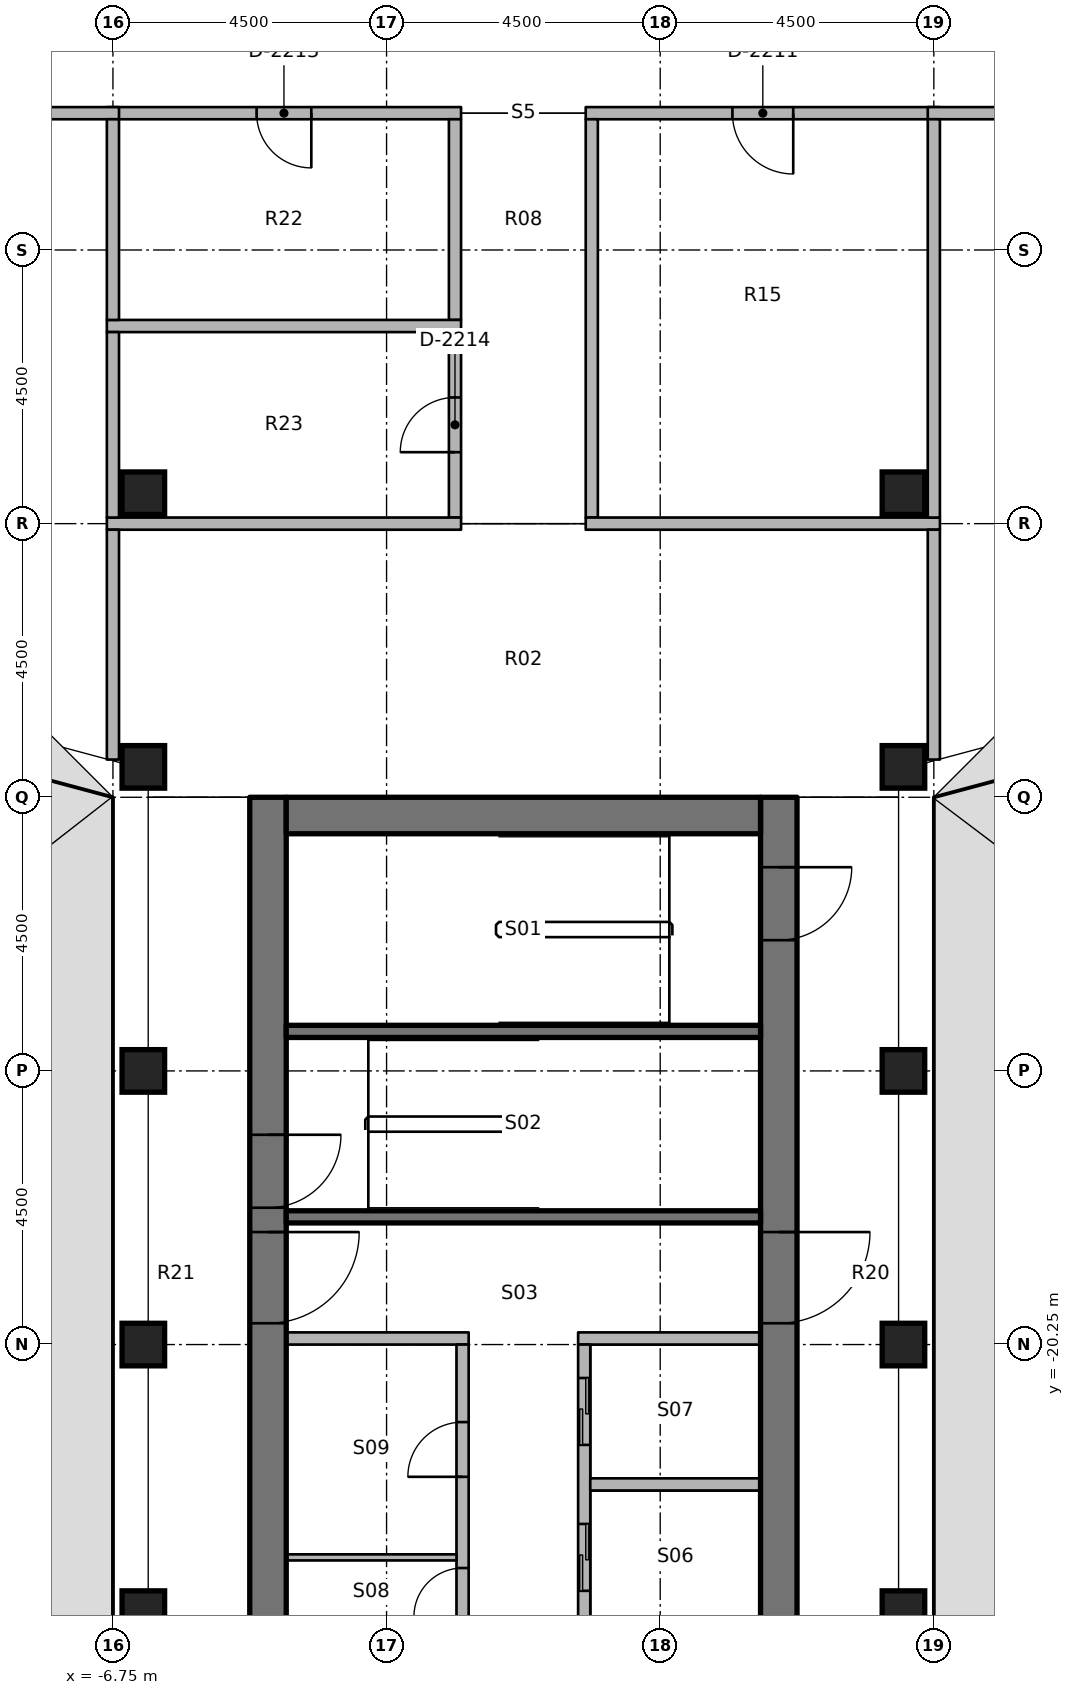
"""IFC4 building model, lengths in metres.
Left out: names, types, materials, properties, quantities, classifications, styles, units other than length and angle.
Written with IfcOpenShell. Run it as: python <this file> out.ifc"""

import sys

from ifc_helpers import new_model, si_unit, direction, frame, frame_2d, origin, origin_2d, place, context, subcontext, project, spatial, rectangle, extrude, element, fill, save


model = new_model("IFC4")
c1 = context("Model", 3, precision=1e-05, world=origin(), true_north=direction((0.0, 1.0)))
c2 = subcontext(c1, "Body", "Model", "MODEL_VIEW")
j1 = project(units=[si_unit("LENGTHUNIT", "METRE"), si_unit("PLANEANGLEUNIT", "RADIAN")], contexts=[c1])
p1 = place(None, origin())
s1 = spatial("IfcSite", under=j1, at=p1, CompositionType="ELEMENT")
p2 = place(p1, origin())
s2 = spatial("IfcBuilding", under=s1, at=p2, CompositionType="ELEMENT")
p3 = place(p2, frame((0.0, 0.0, 206.8)))
s3 = spatial("IfcBuildingStorey", under=s2, at=p3, CompositionType="ELEMENT", Elevation=206.8)
for number, where, z_axis, x_axis in (
    (1, (-6.25, -24.65, 0.0), (0.0, 0.0, 1.0), (1.0, 0.0, 0.0)),
    (2, (-6.25, -20.25, 0.0), (0.0, 0.0, 1.0), (1.0, 0.0, 0.0)),
    (3, (-6.25, -15.75, 0.0), (0.0, 0.0, 1.0), (1.0, 0.0, 0.0)),
    (4, (-6.25, -10.75, 0.0), (0.0, 0.0, 1.0), (1.0, 0.0, 0.0)),
    (5, (-6.25, -6.25, 0.0), (0.0, 0.0, 1.0), (1.0, 0.0, 0.0)),
    (6, (6.25, -24.65, 0.0), (0.0, 0.0, 1.0), (1.0, 0.0, 0.0)),
    (7, (6.25, -20.25, 0.0), (0.0, 0.0, 1.0), (1.0, 0.0, 0.0)),
    (8, (6.25, -15.75, 0.0), (0.0, 0.0, 1.0), (1.0, 0.0, 0.0)),
    (9, (6.25, -10.75, 0.0), (0.0, 0.0, 1.0), (1.0, 0.0, 0.0)),
    (10, (6.25, -6.25, 0.0), (0.0, 0.0, 1.0), (1.0, 0.0, 0.0)),
):
    element("IfcColumn", number, at=place(p3, frame(where, z_axis=z_axis, x_axis=x_axis)), inside=s3, PredefinedType="COLUMN", context=c2, shape_type="SweptSolid", body=[
        extrude(rectangle(XDim=0.7, YDim=0.7, at=origin_2d()), origin(), (0.0, 0.0, 1.0), 3.65),
    ])
p4 = place(p3, frame((-4.2, -11.25, 0.0), z_axis=(0.0, 0.0, 1.0), x_axis=(0.0, -1.0, 0.0)))
e11 = element("IfcWall", 11, at=p4, inside=s3, PredefinedType="SHEAR", context=c2, shape_type="SweptSolid", body=[
    extrude(rectangle(XDim=15.0, YDim=0.6, at=frame_2d((7.5, 0.0))), origin(), (0.0, 0.0, 1.0), 3.8),
])
p5 = place(p4, frame((7.15, 0.0, 0.0)))
e12 = element("IfcOpeningElement", 12, at=p5, cuts=e11, PredefinedType="OPENING", context=c2, shape_type="SweptSolid", body=[
    extrude(rectangle(XDim=1.5, YDim=2.3, at=frame_2d((0.75, 1.15))), frame((0.0, 0.31, 0.0), z_axis=(0.0, -1.0, 0.0), x_axis=(1.0, 0.0, 0.0)), (0.0, 0.0, 1.0), 0.62),
])
p6 = place(p4, frame((5.55, 0.0, 0.0)))
e13 = element("IfcOpeningElement", 13, at=p6, cuts=e11, PredefinedType="OPENING", context=c2, shape_type="SweptSolid", body=[
    extrude(rectangle(XDim=1.2, YDim=2.1, at=frame_2d((0.6, 1.05))), frame((0.0, 0.31, 0.0), z_axis=(0.0, -1.0, 0.0), x_axis=(1.0, 0.0, 0.0)), (0.0, 0.0, 1.0), 0.62),
])
p7 = place(p3, frame((4.2, -11.25, 0.0), z_axis=(0.0, 0.0, 1.0), x_axis=(0.0, -1.0, 0.0)))
e14 = element("IfcWall", 14, at=p7, inside=s3, PredefinedType="SHEAR", context=c2, shape_type="SweptSolid", body=[
    extrude(rectangle(XDim=15.0, YDim=0.6, at=frame_2d((7.5, 0.0))), origin(), (0.0, 0.0, 1.0), 3.8),
])
p8 = place(p7, frame((7.15, 0.0, 0.0)))
e15 = element("IfcOpeningElement", 15, at=p8, cuts=e14, PredefinedType="OPENING", context=c2, shape_type="SweptSolid", body=[
    extrude(rectangle(XDim=1.5, YDim=2.3, at=frame_2d((0.75, 1.15))), frame((0.0, 0.31, 0.0), z_axis=(0.0, -1.0, 0.0), x_axis=(1.0, 0.0, 0.0)), (0.0, 0.0, 1.0), 0.62),
])
p9 = place(p7, frame((13.9, 0.0, 0.0)))
e16 = element("IfcOpeningElement", 16, at=p9, cuts=e14, PredefinedType="OPENING", context=c2, shape_type="SweptSolid", body=[
    extrude(rectangle(XDim=0.9, YDim=2.1, at=frame_2d((0.45, 1.05))), frame((0.0, 0.31, 0.0), z_axis=(0.0, -1.0, 0.0), x_axis=(1.0, 0.0, 0.0)), (0.0, 0.0, 1.0), 0.62),
])
p10 = place(p7, frame((1.15, 0.0, 0.0)))
e17 = element("IfcOpeningElement", 17, at=p10, cuts=e14, PredefinedType="OPENING", context=c2, shape_type="SweptSolid", body=[
    extrude(rectangle(XDim=1.2, YDim=2.1, at=frame_2d((0.6, 1.05))), frame((0.0, 0.31, 0.0), z_axis=(0.0, -1.0, 0.0), x_axis=(1.0, 0.0, 0.0)), (0.0, 0.0, 1.0), 0.62),
])
p11 = place(p3, frame((-3.9, -11.55, 0.0), z_axis=(0.0, 0.0, 1.0), x_axis=(1.0, 0.0, 0.0)))
e18 = element("IfcWall", 18, at=p11, inside=s3, PredefinedType="SHEAR", context=c2, shape_type="SweptSolid", body=[
    extrude(rectangle(XDim=7.8, YDim=0.6, at=frame_2d((3.9, 0.0))), origin(), (0.0, 0.0, 1.0), 3.8),
])
for number, where, z_axis, x_axis in (
    (19, (3.9, -18.15, 0.0), (0.0, 0.0, 1.0), (-1.0, 0.0, 0.0)),
    (20, (3.9, -15.1, 0.0), (0.0, 0.0, 1.0), (-1.0, 0.0, 0.0)),
):
    element("IfcWall", number, at=place(p3, frame(where, z_axis=z_axis, x_axis=x_axis)), inside=s3, PredefinedType="SHEAR", context=c2, shape_type="SweptSolid", body=[
        extrude(rectangle(XDim=7.8, YDim=0.2, at=frame_2d((3.9, 0.0))), origin(), (0.0, 0.0, 1.0), 3.65),
    ])
p12 = place(p3, frame((3.9, -20.15, 0.0), z_axis=(0.0, 0.0, 1.0), x_axis=(-1.0, 0.0, 0.0)))
e21 = element("IfcWall", 21, at=p12, inside=s3, PredefinedType="PARTITIONING", context=c2, shape_type="SweptSolid", body=[
    extrude(rectangle(XDim=3.0, YDim=0.2, at=frame_2d((1.5, 0.0))), origin(), (0.0, 0.0, 1.0), 3.65),
])
p13 = place(p3, frame((1.0, -24.85, 0.0), z_axis=(0.0, 0.0, 1.0), x_axis=(0.0, 1.0, 0.0)))
e22 = element("IfcWall", 22, at=p13, inside=s3, PredefinedType="PARTITIONING", context=c2, shape_type="SweptSolid", body=[
    extrude(rectangle(XDim=4.6, YDim=0.2, at=frame_2d((2.3, 0.0))), origin(), (0.0, 0.0, 1.0), 3.65),
])
p14 = place(p13, frame((0.55, 0.0, 0.0)))
e23 = element("IfcOpeningElement", 23, at=p14, cuts=e22, PredefinedType="OPENING", context=c2, shape_type="SweptSolid", body=[
    extrude(rectangle(XDim=1.1, YDim=2.3, at=frame_2d((0.55, 1.15))), frame((0.0, 0.11, 0.0), z_axis=(0.0, -1.0, 0.0), x_axis=(1.0, 0.0, 0.0)), (0.0, 0.0, 1.0), 0.22),
])
p15 = place(p13, frame((2.95, 0.0, 0.0)))
e24 = element("IfcOpeningElement", 24, at=p15, cuts=e22, PredefinedType="OPENING", context=c2, shape_type="SweptSolid", body=[
    extrude(rectangle(XDim=1.1, YDim=2.3, at=frame_2d((0.55, 1.15))), frame((0.0, 0.11, 0.0), z_axis=(0.0, -1.0, 0.0), x_axis=(1.0, 0.0, 0.0)), (0.0, 0.0, 1.0), 0.22),
])
p16 = place(p3, frame((-0.9, -20.15, 0.0), z_axis=(0.0, 0.0, 1.0), x_axis=(-1.0, 0.0, 0.0)))
e25 = element("IfcWall", 25, at=p16, inside=s3, PredefinedType="PARTITIONING", context=c2, shape_type="SweptSolid", body=[
    extrude(rectangle(XDim=3.0, YDim=0.2, at=frame_2d((1.5, 0.0))), origin(), (0.0, 0.0, 1.0), 3.65),
])
p17 = place(p3, frame((-1.0, -24.85, 0.0), z_axis=(0.0, 0.0, 1.0), x_axis=(0.0, 1.0, 0.0)))
e26 = element("IfcWall", 26, at=p17, inside=s3, PredefinedType="PARTITIONING", context=c2, shape_type="SweptSolid", body=[
    extrude(rectangle(XDim=4.6, YDim=0.2, at=frame_2d((2.3, 0.0))), origin(), (0.0, 0.0, 1.0), 3.65),
])
p18 = place(p17, frame((0.125, 0.0, 0.0)))
e27 = element("IfcOpeningElement", 27, at=p18, cuts=e26, PredefinedType="OPENING", context=c2, shape_type="SweptSolid", body=[
    extrude(rectangle(XDim=0.8, YDim=2.1, at=frame_2d((0.4, 1.05))), frame((0.0, 0.11, 0.0), z_axis=(0.0, -1.0, 0.0), x_axis=(1.0, 0.0, 0.0)), (0.0, 0.0, 1.0), 0.22),
])
p19 = place(p17, frame((2.425, 0.0, 0.0)))
e28 = element("IfcOpeningElement", 28, at=p19, cuts=e26, PredefinedType="OPENING", context=c2, shape_type="SweptSolid", body=[
    extrude(rectangle(XDim=0.9, YDim=2.1, at=frame_2d((0.45, 1.05))), frame((0.0, 0.11, 0.0), z_axis=(0.0, -1.0, 0.0), x_axis=(1.0, 0.0, 0.0)), (0.0, 0.0, 1.0), 0.22),
])
p20 = place(p3, frame((3.9, -22.55, 0.0), z_axis=(0.0, 0.0, 1.0), x_axis=(-1.0, 0.0, 0.0)))
e29 = element("IfcWall", 29, at=p20, inside=s3, PredefinedType="PARTITIONING", context=c2, shape_type="SweptSolid", body=[
    extrude(rectangle(XDim=2.8, YDim=0.2, at=frame_2d((1.4, 0.0))), origin(), (0.0, 0.0, 1.0), 3.65),
])
p21 = place(p3, frame((-1.1, -23.75, 0.0), z_axis=(0.0, 0.0, 1.0), x_axis=(-1.0, 0.0, 0.0)))
e30 = element("IfcWall", 30, at=p21, inside=s3, PredefinedType="PARTITIONING", context=c2, shape_type="SweptSolid", body=[
    extrude(rectangle(XDim=2.8, YDim=0.1, at=frame_2d((1.4, 0.0))), origin(), (0.0, 0.0, 1.0), 3.65),
])
p22 = place(p3, frame((6.85, 0.0, 0.0), z_axis=(0.0, 0.0, 1.0), x_axis=(-1.0, 0.0, 0.0)))
e31 = element("IfcWall", 31, at=p22, inside=s3, PredefinedType="PARTITIONING", context=c2, shape_type="SweptSolid", body=[
    extrude(rectangle(XDim=5.825, YDim=0.2, at=frame_2d((2.913, 0.0))), origin(), (0.0, 0.0, 1.0), 2.75),
])
p23 = place(p22, frame((2.413, 0.0, 0.0)))
e32 = element("IfcOpeningElement", 32, at=p23, cuts=e31, PredefinedType="OPENING", context=c2, shape_type="SweptSolid", body=[
    extrude(rectangle(XDim=1.0, YDim=2.1, at=frame_2d((0.5, 1.05))), frame((0.0, 0.11, 0.0), z_axis=(0.0, -1.0, 0.0), x_axis=(1.0, 0.0, 0.0)), (0.0, 0.0, 1.0), 0.22),
])
p24 = place(p3, frame((11.35, 0.0, 0.0), z_axis=(0.0, 0.0, 1.0), x_axis=(-1.0, 0.0, 0.0)))
e33 = element("IfcWall", 33, at=p24, inside=s3, PredefinedType="PARTITIONING", context=c2, shape_type="SweptSolid", body=[
    extrude(rectangle(XDim=4.7, YDim=0.2, at=frame_2d((2.35, 0.0))), origin(), (0.0, 0.0, 1.0), 2.75),
])
p25 = place(p24, frame((1.85, 0.0, 0.0)))
e34 = element("IfcOpeningElement", 34, at=p25, cuts=e33, PredefinedType="OPENING", context=c2, shape_type="SweptSolid", body=[
    extrude(rectangle(XDim=1.0, YDim=2.1, at=frame_2d((0.5, 1.05))), frame((0.0, 0.11, 0.0), z_axis=(0.0, -1.0, 0.0), x_axis=(1.0, 0.0, 0.0)), (0.0, 0.0, 1.0), 0.22),
])
p26 = place(p3, frame((-1.025, 0.0, 0.0), z_axis=(0.0, 0.0, 1.0), x_axis=(-1.0, 0.0, 0.0)))
e35 = element("IfcWall", 35, at=p26, inside=s3, PredefinedType="PARTITIONING", context=c2, shape_type="SweptSolid", body=[
    extrude(rectangle(XDim=5.825, YDim=0.2, at=frame_2d((2.913, 0.0))), origin(), (0.0, 0.0, 1.0), 2.75),
])
p27 = place(p26, frame((2.462, 0.0, 0.0)))
e36 = element("IfcOpeningElement", 36, at=p27, cuts=e35, PredefinedType="OPENING", context=c2, shape_type="SweptSolid", body=[
    extrude(rectangle(XDim=0.9, YDim=2.1, at=frame_2d((0.45, 1.05))), frame((0.0, 0.11, 0.0), z_axis=(0.0, -1.0, 0.0), x_axis=(1.0, 0.0, 0.0)), (0.0, 0.0, 1.0), 0.22),
])
p28 = place(p3, frame((-6.65, 0.0, 0.0), z_axis=(0.0, 0.0, 1.0), x_axis=(-1.0, 0.0, 0.0)))
e37 = element("IfcWall", 37, at=p28, inside=s3, PredefinedType="PARTITIONING", context=c2, shape_type="SweptSolid", body=[
    extrude(rectangle(XDim=4.7, YDim=0.2, at=frame_2d((2.35, 0.0))), origin(), (0.0, 0.0, 1.0), 2.75),
])
p29 = place(p28, frame((1.85, 0.0, 0.0)))
e38 = element("IfcOpeningElement", 38, at=p29, cuts=e37, PredefinedType="OPENING", context=c2, shape_type="SweptSolid", body=[
    extrude(rectangle(XDim=1.0, YDim=2.1, at=frame_2d((0.5, 1.05))), frame((0.0, 0.11, 0.0), z_axis=(0.0, -1.0, 0.0), x_axis=(1.0, 0.0, 0.0)), (0.0, 0.0, 1.0), 0.22),
])
p30 = place(p3, frame((1.125, -6.65, 0.0), z_axis=(0.0, 0.0, 1.0), x_axis=(0.0, 1.0, 0.0)))
e39 = element("IfcWall", 39, at=p30, inside=s3, PredefinedType="PARTITIONING", context=c2, shape_type="SweptSolid", body=[
    extrude(rectangle(XDim=6.55, YDim=0.2, at=frame_2d((3.275, 0.0))), origin(), (0.0, 0.0, 1.0), 2.75),
])
p31 = place(p3, frame((-1.125, -3.4, 0.0), z_axis=(0.0, 0.0, 1.0), x_axis=(0.0, 1.0, 0.0)))
e40 = element("IfcWall", 40, at=p31, inside=s3, PredefinedType="PARTITIONING", context=c2, shape_type="SweptSolid", body=[
    extrude(rectangle(XDim=3.3, YDim=0.2, at=frame_2d((1.65, 0.0))), origin(), (0.0, 0.0, 1.0), 2.75),
])
p32 = place(p3, frame((-1.125, -6.65, 0.0), z_axis=(0.0, 0.0, 1.0), x_axis=(0.0, 1.0, 0.0)))
e41 = element("IfcWall", 41, at=p32, inside=s3, PredefinedType="PARTITIONING", context=c2, shape_type="SweptSolid", body=[
    extrude(rectangle(XDim=3.05, YDim=0.2, at=frame_2d((1.525, 0.0))), origin(), (0.0, 0.0, 1.0), 2.75),
])
p33 = place(p32, frame((1.075, 0.0, 0.0)))
e42 = element("IfcOpeningElement", 42, at=p33, cuts=e41, PredefinedType="OPENING", context=c2, shape_type="SweptSolid", body=[
    extrude(rectangle(XDim=0.9, YDim=2.1, at=frame_2d((0.45, 1.05))), frame((0.0, 0.11, 0.0), z_axis=(0.0, -1.0, 0.0), x_axis=(1.0, 0.0, 0.0)), (0.0, 0.0, 1.0), 0.22),
])
p34 = place(p3, frame((1.025, -6.75, 0.0), z_axis=(0.0, 0.0, 1.0), x_axis=(1.0, 0.0, 0.0)))
e43 = element("IfcWall", 43, at=p34, inside=s3, PredefinedType="PARTITIONING", context=c2, shape_type="SweptSolid", body=[
    extrude(rectangle(XDim=5.825, YDim=0.2, at=frame_2d((2.913, 0.0))), origin(), (0.0, 0.0, 1.0), 2.75),
])
p35 = place(p3, frame((6.75, -10.63, 0.0), z_axis=(0.0, 0.0, 1.0), x_axis=(0.0, 1.0, 0.0)))
e44 = element("IfcWall", 44, at=p35, inside=s3, PredefinedType="PARTITIONING", context=c2, shape_type="SweptSolid", body=[
    extrude(rectangle(XDim=3.78, YDim=0.2, at=frame_2d((1.89, 0.0))), origin(), (0.0, 0.0, 1.0), 2.75),
])
p36 = place(p3, frame((-6.85, -6.75, 0.0), z_axis=(0.0, 0.0, 1.0), x_axis=(1.0, 0.0, 0.0)))
e45 = element("IfcWall", 45, at=p36, inside=s3, PredefinedType="PARTITIONING", context=c2, shape_type="SweptSolid", body=[
    extrude(rectangle(XDim=5.825, YDim=0.2, at=frame_2d((2.913, 0.0))), origin(), (0.0, 0.0, 1.0), 2.75),
])
p37 = place(p3, frame((-6.75, -10.63, 0.0), z_axis=(0.0, 0.0, 1.0), x_axis=(0.0, 1.0, 0.0)))
e46 = element("IfcWall", 46, at=p37, inside=s3, PredefinedType="PARTITIONING", context=c2, shape_type="SweptSolid", body=[
    extrude(rectangle(XDim=3.78, YDim=0.2, at=frame_2d((1.89, 0.0))), origin(), (0.0, 0.0, 1.0), 2.75),
])
p38 = place(p3, frame((6.75, -6.65, 0.0), z_axis=(0.0, 0.0, 1.0), x_axis=(0.0, 1.0, 0.0)))
e47 = element("IfcWall", 47, at=p38, inside=s3, PredefinedType="PARTITIONING", context=c2, shape_type="SweptSolid", body=[
    extrude(rectangle(XDim=6.55, YDim=0.2, at=frame_2d((3.275, 0.0))), origin(), (0.0, 0.0, 1.0), 2.75),
])
p39 = place(p3, frame((-6.85, -3.5, 0.0), z_axis=(0.0, 0.0, 1.0), x_axis=(1.0, 0.0, 0.0)))
e48 = element("IfcWall", 48, at=p39, inside=s3, PredefinedType="PARTITIONING", context=c2, shape_type="SweptSolid", body=[
    extrude(rectangle(XDim=5.825, YDim=0.2, at=frame_2d((2.913, 0.0))), origin(), (0.0, 0.0, 1.0), 2.75),
])
p40 = place(p3, frame((-6.75, -3.4, 0.0), z_axis=(0.0, 0.0, 1.0), x_axis=(0.0, 1.0, 0.0)))
e49 = element("IfcWall", 49, at=p40, inside=s3, PredefinedType="PARTITIONING", context=c2, shape_type="SweptSolid", body=[
    extrude(rectangle(XDim=3.3, YDim=0.2, at=frame_2d((1.65, 0.0))), origin(), (0.0, 0.0, 1.0), 2.75),
])
p41 = place(p3, frame((-6.75, -6.65, 0.0), z_axis=(0.0, 0.0, 1.0), x_axis=(0.0, 1.0, 0.0)))
e50 = element("IfcWall", 50, at=p41, inside=s3, PredefinedType="PARTITIONING", context=c2, shape_type="SweptSolid", body=[
    extrude(rectangle(XDim=3.05, YDim=0.2, at=frame_2d((1.525, 0.0))), origin(), (0.0, 0.0, 1.0), 2.75),
])
p42 = place(p8, origin())
e51 = element("IfcDoor", 51, at=p42, inside=s3, OperationType="DOUBLE_DOOR_SINGLE_SWING", PredefinedType="DOOR", context=c2, shape_type="SweptSolid", body=[
    extrude(rectangle(XDim=1.5, YDim=2.3, at=frame_2d((0.75, 1.15))), frame((0.0, 0.025, 0.0), z_axis=(0.0, -1.0, 0.0), x_axis=(1.0, 0.0, 0.0)), (0.0, 0.0, 1.0), 0.05),
])
fill(e15, e51)
p43 = place(p5, origin())
e52 = element("IfcDoor", 52, at=p43, inside=s3, OperationType="DOUBLE_DOOR_SINGLE_SWING", PredefinedType="DOOR", context=c2, shape_type="SweptSolid", body=[
    extrude(rectangle(XDim=1.5, YDim=2.3, at=frame_2d((0.75, 1.15))), frame((0.0, 0.025, 0.0), z_axis=(0.0, -1.0, 0.0), x_axis=(1.0, 0.0, 0.0)), (0.0, 0.0, 1.0), 0.05),
])
fill(e12, e52)
p44 = place(p6, origin())
e53 = element("IfcDoor", 53, at=p44, inside=s3, OperationType="SINGLE_SWING_LEFT", PredefinedType="DOOR", context=c2, shape_type="SweptSolid", body=[
    extrude(rectangle(XDim=1.2, YDim=2.1, at=frame_2d((0.6, 1.05))), frame((0.0, 0.025, 0.0), z_axis=(0.0, -1.0, 0.0), x_axis=(1.0, 0.0, 0.0)), (0.0, 0.0, 1.0), 0.05),
])
fill(e13, e53)
p45 = place(p10, origin())
e54 = element("IfcDoor", 54, at=p45, inside=s3, OperationType="SINGLE_SWING_LEFT", PredefinedType="DOOR", context=c2, shape_type="SweptSolid", body=[
    extrude(rectangle(XDim=1.2, YDim=2.1, at=frame_2d((0.6, 1.05))), frame((0.0, 0.025, 0.0), z_axis=(0.0, -1.0, 0.0), x_axis=(1.0, 0.0, 0.0)), (0.0, 0.0, 1.0), 0.05),
])
fill(e17, e54)
p46 = place(p14, origin())
e55 = element("IfcDoor", 55, at=p46, inside=s3, OperationType="DOUBLE_DOOR_SLIDING", PredefinedType="DOOR", context=c2, shape_type="SweptSolid", body=[
    extrude(rectangle(XDim=1.1, YDim=2.3, at=frame_2d((0.55, 1.15))), frame((0.0, 0.025, 0.0), z_axis=(0.0, -1.0, 0.0), x_axis=(1.0, 0.0, 0.0)), (0.0, 0.0, 1.0), 0.05),
])
fill(e23, e55)
p47 = place(p15, origin())
e56 = element("IfcDoor", 56, at=p47, inside=s3, OperationType="DOUBLE_DOOR_SLIDING", PredefinedType="DOOR", context=c2, shape_type="SweptSolid", body=[
    extrude(rectangle(XDim=1.1, YDim=2.3, at=frame_2d((0.55, 1.15))), frame((0.0, 0.025, 0.0), z_axis=(0.0, -1.0, 0.0), x_axis=(1.0, 0.0, 0.0)), (0.0, 0.0, 1.0), 0.05),
])
fill(e24, e56)
p48 = place(p18, origin())
e57 = element("IfcDoor", 57, at=p48, inside=s3, OperationType="SINGLE_SWING_LEFT", PredefinedType="DOOR", context=c2, shape_type="SweptSolid", body=[
    extrude(rectangle(XDim=0.8, YDim=2.1, at=frame_2d((0.4, 1.05))), frame((0.0, 0.025, 0.0), z_axis=(0.0, -1.0, 0.0), x_axis=(1.0, 0.0, 0.0)), (0.0, 0.0, 1.0), 0.05),
])
fill(e27, e57)
p49 = place(p19, origin())
e58 = element("IfcDoor", 58, at=p49, inside=s3, OperationType="SINGLE_SWING_RIGHT", PredefinedType="DOOR", context=c2, shape_type="SweptSolid", body=[
    extrude(rectangle(XDim=0.9, YDim=2.1, at=frame_2d((0.45, 1.05))), frame((0.0, 0.025, 0.0), z_axis=(0.0, -1.0, 0.0), x_axis=(1.0, 0.0, 0.0)), (0.0, 0.0, 1.0), 0.05),
])
fill(e28, e58)
p50 = place(p23, origin())
e59 = element("IfcDoor", 59, at=p50, inside=s3, OperationType="SINGLE_SWING_RIGHT", PredefinedType="DOOR", context=c2, shape_type="SweptSolid", body=[
    extrude(rectangle(XDim=1.0, YDim=2.1, at=frame_2d((0.5, 1.05))), frame((0.0, 0.025, 0.0), z_axis=(0.0, -1.0, 0.0), x_axis=(1.0, 0.0, 0.0)), (0.0, 0.0, 1.0), 0.05),
])
fill(e32, e59)
p51 = place(p27, origin())
e60 = element("IfcDoor", 60, at=p51, inside=s3, OperationType="SINGLE_SWING_RIGHT", PredefinedType="DOOR", context=c2, shape_type="SweptSolid", body=[
    extrude(rectangle(XDim=0.9, YDim=2.1, at=frame_2d((0.45, 1.05))), frame((0.0, 0.025, 0.0), z_axis=(0.0, -1.0, 0.0), x_axis=(1.0, 0.0, 0.0)), (0.0, 0.0, 1.0), 0.05),
])
fill(e36, e60)
p52 = place(p33, origin())
e61 = element("IfcDoor", 61, at=p52, inside=s3, OperationType="SINGLE_SWING_RIGHT", PredefinedType="DOOR", context=c2, shape_type="SweptSolid", body=[
    extrude(rectangle(XDim=0.9, YDim=2.1, at=frame_2d((0.45, 1.05))), frame((0.0, 0.025, 0.0), z_axis=(0.0, -1.0, 0.0), x_axis=(1.0, 0.0, 0.0)), (0.0, 0.0, 1.0), 0.05),
])
fill(e42, e61)
save(model, sys.argv[1])
